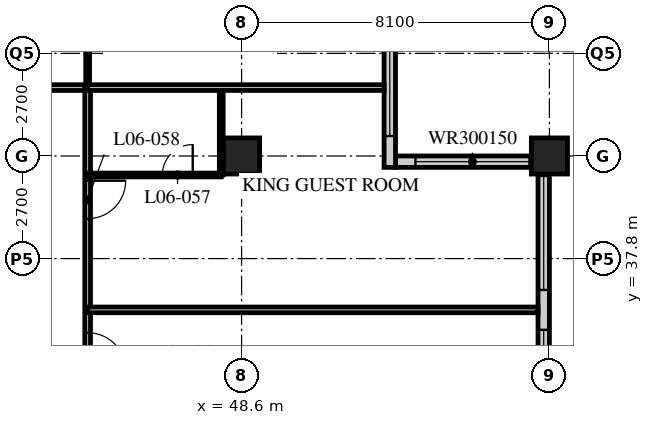
"""IFC4 building model, lengths in metres.
Left out: names, types, materials, properties, quantities, classifications, styles, units other than length and angle.
Written with IfcOpenShell. Run it as: python <this file> out.ifc"""

import sys

from ifc_helpers import new_model, si_unit, direction, frame, frame_2d, origin, origin_2d, place, context, subcontext, project, spatial, rectangle, hollow_rectangle, extrude, element, fill, save


model = new_model("IFC4")
c1 = context("Model", 3, precision=1e-05, world=origin(), true_north=direction((0.0, 1.0)))
c2 = subcontext(c1, "Body", "Model", "MODEL_VIEW")
j1 = project(units=[si_unit("LENGTHUNIT", "METRE"), si_unit("PLANEANGLEUNIT", "RADIAN")], contexts=[c1])
p1 = place(None, origin())
s1 = spatial("IfcSite", under=j1, at=p1, CompositionType="ELEMENT")
p2 = place(p1, origin())
s2 = spatial("IfcBuilding", under=s1, at=p2, CompositionType="ELEMENT")
p3 = place(p2, frame((0.0, 0.0, 33.0)))
s3 = spatial("IfcBuildingStorey", under=s2, at=p3, CompositionType="ELEMENT", Elevation=33.0)
for number, where, z_axis, x_axis in (
    (1, (48.6, 40.5, 0.0), (0.0, 0.0, 1.0), (1.0, 0.0, 0.0)),
    (2, (56.7, 40.5, 0.0), (0.0, 0.0, 1.0), (1.0, 0.0, 0.0)),
):
    element("IfcColumn", number, at=place(p3, frame(where, z_axis=z_axis, x_axis=x_axis)), inside=s3, PredefinedType="COLUMN", context=c2, shape_type="SweptSolid", body=[
        extrude(hollow_rectangle(XDim=0.95, YDim=0.95, WallThickness=0.095, at=origin_2d()), origin(), (0.0, 0.0, 1.0), 3.4),
    ])
p4 = place(p3, frame((56.55, 8.4, 0.0), z_axis=(0.0, 0.0, 1.0), x_axis=(0.0, 1.0, 0.0)))
e3 = element("IfcWall", 3, at=p4, inside=s3, PredefinedType="SOLIDWALL", context=c2, shape_type="SweptSolid", body=[
    extrude(rectangle(XDim=32.1, YDim=0.3, at=frame_2d((16.05, 0.0))), origin(), (0.0, 0.0, 1.0), 3.19),
])
p5 = place(p4, frame((0.225, 0.0, 0.9)))
e4 = element("IfcOpeningElement", 4, at=p5, cuts=e3, PredefinedType="OPENING", context=c2, shape_type="SweptSolid", body=[
    extrude(rectangle(XDim=3.0, YDim=2.0, at=frame_2d((1.5, 1.0))), frame((0.0, 0.16, 0.0), z_axis=(0.0, -1.0, 0.0), x_axis=(1.0, 0.0, 0.0)), (0.0, 0.0, 1.0), 0.32),
])
p6 = place(p4, frame((4.275, 0.0, 0.9)))
e5 = element("IfcOpeningElement", 5, at=p6, cuts=e3, PredefinedType="OPENING", context=c2, shape_type="SweptSolid", body=[
    extrude(rectangle(XDim=3.0, YDim=2.0, at=frame_2d((1.5, 1.0))), frame((0.0, 0.16, 0.0), z_axis=(0.0, -1.0, 0.0), x_axis=(1.0, 0.0, 0.0)), (0.0, 0.0, 1.0), 0.32),
])
p7 = place(p4, frame((8.325, 0.0, 0.9)))
e6 = element("IfcOpeningElement", 6, at=p7, cuts=e3, PredefinedType="OPENING", context=c2, shape_type="SweptSolid", body=[
    extrude(rectangle(XDim=3.0, YDim=2.0, at=frame_2d((1.5, 1.0))), frame((0.0, 0.16, 0.0), z_axis=(0.0, -1.0, 0.0), x_axis=(1.0, 0.0, 0.0)), (0.0, 0.0, 1.0), 0.32),
])
p8 = place(p4, frame((12.375, 0.0, 0.9)))
e7 = element("IfcOpeningElement", 7, at=p8, cuts=e3, PredefinedType="OPENING", context=c2, shape_type="SweptSolid", body=[
    extrude(rectangle(XDim=3.0, YDim=2.0, at=frame_2d((1.5, 1.0))), frame((0.0, 0.16, 0.0), z_axis=(0.0, -1.0, 0.0), x_axis=(1.0, 0.0, 0.0)), (0.0, 0.0, 1.0), 0.32),
])
p9 = place(p4, frame((16.425, 0.0, 0.9)))
e8 = element("IfcOpeningElement", 8, at=p9, cuts=e3, PredefinedType="OPENING", context=c2, shape_type="SweptSolid", body=[
    extrude(rectangle(XDim=3.0, YDim=2.0, at=frame_2d((1.5, 1.0))), frame((0.0, 0.16, 0.0), z_axis=(0.0, -1.0, 0.0), x_axis=(1.0, 0.0, 0.0)), (0.0, 0.0, 1.0), 0.32),
])
p10 = place(p4, frame((20.475, 0.0, 0.9)))
e9 = element("IfcOpeningElement", 9, at=p10, cuts=e3, PredefinedType="OPENING", context=c2, shape_type="SweptSolid", body=[
    extrude(rectangle(XDim=3.0, YDim=2.0, at=frame_2d((1.5, 1.0))), frame((0.0, 0.16, 0.0), z_axis=(0.0, -1.0, 0.0), x_axis=(1.0, 0.0, 0.0)), (0.0, 0.0, 1.0), 0.32),
])
p11 = place(p4, frame((24.525, 0.0, 0.9)))
e10 = element("IfcOpeningElement", 10, at=p11, cuts=e3, PredefinedType="OPENING", context=c2, shape_type="SweptSolid", body=[
    extrude(rectangle(XDim=3.0, YDim=2.0, at=frame_2d((1.5, 1.0))), frame((0.0, 0.16, 0.0), z_axis=(0.0, -1.0, 0.0), x_axis=(1.0, 0.0, 0.0)), (0.0, 0.0, 1.0), 0.32),
])
p12 = place(p4, frame((28.575, 0.0, 0.9)))
e11 = element("IfcOpeningElement", 11, at=p12, cuts=e3, PredefinedType="OPENING", context=c2, shape_type="SweptSolid", body=[
    extrude(rectangle(XDim=3.0, YDim=2.0, at=frame_2d((1.5, 1.0))), frame((0.0, 0.16, 0.0), z_axis=(0.0, -1.0, 0.0), x_axis=(1.0, 0.0, 0.0)), (0.0, 0.0, 1.0), 0.32),
])
p13 = place(p3, frame((56.4, 40.35, 0.0), z_axis=(0.0, 0.0, 1.0), x_axis=(-1.0, 0.0, 0.0)))
e12 = element("IfcWall", 12, at=p13, inside=s3, PredefinedType="SOLIDWALL", context=c2, shape_type="SweptSolid", body=[
    extrude(rectangle(XDim=3.75, YDim=0.3, at=frame_2d((1.875, 0.0))), origin(), (0.0, 0.0, 1.0), 3.19),
])
p14 = place(p13, frame((0.225, 0.0, 0.9)))
e13 = element("IfcOpeningElement", 13, at=p14, cuts=e12, PredefinedType="OPENING", context=c2, shape_type="SweptSolid", body=[
    extrude(rectangle(XDim=3.0, YDim=1.5, at=frame_2d((1.5, 0.75))), frame((0.0, 0.16, 0.0), z_axis=(0.0, -1.0, 0.0), x_axis=(1.0, 0.0, 0.0)), (0.0, 0.0, 1.0), 0.32),
])
p15 = place(p3, frame((52.5, 40.2, 0.0), z_axis=(0.0, 0.0, 1.0), x_axis=(0.0, 1.0, 0.0)))
e14 = element("IfcWall", 14, at=p15, inside=s3, PredefinedType="SOLIDWALL", context=c2, shape_type="SweptSolid", body=[
    extrude(rectangle(XDim=4.35, YDim=0.3, at=frame_2d((2.175, 0.0))), origin(), (0.0, 0.0, 1.0), 3.19),
])
p16 = place(p15, frame((0.825, 0.0, 0.9)))
e15 = element("IfcOpeningElement", 15, at=p16, cuts=e14, PredefinedType="OPENING", context=c2, shape_type="SweptSolid", body=[
    extrude(rectangle(XDim=3.0, YDim=1.5, at=frame_2d((1.5, 0.75))), frame((0.0, 0.16, 0.0), z_axis=(0.0, -1.0, 0.0), x_axis=(1.0, 0.0, 0.0)), (0.0, 0.0, 1.0), 0.32),
])
p17 = place(p3, frame((12.15, 42.3, 0.0), z_axis=(0.0, 0.0, 1.0), x_axis=(1.0, 0.0, 0.0)))
e16 = element("IfcWall", 16, at=p17, inside=s3, PredefinedType="PARTITIONING", context=c2, shape_type="SweptSolid", body=[
    extrude(rectangle(XDim=32.4, YDim=0.15, at=frame_2d((16.2, 0.0))), origin(), (0.0, 0.0, 1.0), 3.19),
])
p18 = place(p17, frame((6.5, 0.0, 0.0)))
e17 = element("IfcOpeningElement", 17, at=p18, cuts=e16, PredefinedType="OPENING", context=c2, shape_type="SweptSolid", body=[
    extrude(rectangle(XDim=1.0, YDim=2.1, at=frame_2d((0.5, 1.05))), frame((0.0, 0.085, 0.0), z_axis=(0.0, -1.0, 0.0), x_axis=(1.0, 0.0, 0.0)), (0.0, 0.0, 1.0), 0.17),
])
p19 = place(p17, frame((8.4, 0.0, 0.0)))
e18 = element("IfcOpeningElement", 18, at=p19, cuts=e16, PredefinedType="OPENING", context=c2, shape_type="SweptSolid", body=[
    extrude(rectangle(XDim=1.0, YDim=2.1, at=frame_2d((0.5, 1.05))), frame((0.0, 0.085, 0.0), z_axis=(0.0, -1.0, 0.0), x_axis=(1.0, 0.0, 0.0)), (0.0, 0.0, 1.0), 0.17),
])
p20 = place(p17, frame((14.6, 0.0, 0.0)))
e19 = element("IfcOpeningElement", 19, at=p20, cuts=e16, PredefinedType="OPENING", context=c2, shape_type="SweptSolid", body=[
    extrude(rectangle(XDim=1.0, YDim=2.1, at=frame_2d((0.5, 1.05))), frame((0.0, 0.085, 0.0), z_axis=(0.0, -1.0, 0.0), x_axis=(1.0, 0.0, 0.0)), (0.0, 0.0, 1.0), 0.17),
])
p21 = place(p17, frame((18.65, 0.0, 0.0)))
e20 = element("IfcOpeningElement", 20, at=p21, cuts=e16, PredefinedType="OPENING", context=c2, shape_type="SweptSolid", body=[
    extrude(rectangle(XDim=1.0, YDim=2.1, at=frame_2d((0.5, 1.05))), frame((0.0, 0.085, 0.0), z_axis=(0.0, -1.0, 0.0), x_axis=(1.0, 0.0, 0.0)), (0.0, 0.0, 1.0), 0.17),
])
p22 = place(p17, frame((23.0, 0.0, 0.0)))
e21 = element("IfcOpeningElement", 21, at=p22, cuts=e16, PredefinedType="OPENING", context=c2, shape_type="SweptSolid", body=[
    extrude(rectangle(XDim=1.0, YDim=2.1, at=frame_2d((0.5, 1.05))), frame((0.0, 0.085, 0.0), z_axis=(0.0, -1.0, 0.0), x_axis=(1.0, 0.0, 0.0)), (0.0, 0.0, 1.0), 0.17),
])
p23 = place(p17, frame((26.75, 0.0, 0.0)))
e22 = element("IfcOpeningElement", 22, at=p23, cuts=e16, PredefinedType="OPENING", context=c2, shape_type="SweptSolid", body=[
    extrude(rectangle(XDim=1.0, YDim=2.1, at=frame_2d((0.5, 1.05))), frame((0.0, 0.085, 0.0), z_axis=(0.0, -1.0, 0.0), x_axis=(1.0, 0.0, 0.0)), (0.0, 0.0, 1.0), 0.17),
])
p24 = place(p17, frame((28.775, 0.0, 0.0)))
e23 = element("IfcOpeningElement", 23, at=p24, cuts=e16, PredefinedType="OPENING", context=c2, shape_type="SweptSolid", body=[
    extrude(rectangle(XDim=1.0, YDim=2.1, at=frame_2d((0.5, 1.05))), frame((0.0, 0.085, 0.0), z_axis=(0.0, -1.0, 0.0), x_axis=(1.0, 0.0, 0.0)), (0.0, 0.0, 1.0), 0.17),
])
p25 = place(p17, frame((2.625, 0.0, 0.0)))
e24 = element("IfcOpeningElement", 24, at=p25, cuts=e16, PredefinedType="OPENING", context=c2, shape_type="SweptSolid", body=[
    extrude(rectangle(XDim=1.0, YDim=2.1, at=frame_2d((0.5, 1.05))), frame((0.0, 0.085, 0.0), z_axis=(0.0, -1.0, 0.0), x_axis=(1.0, 0.0, 0.0)), (0.0, 0.0, 1.0), 0.17),
])
p26 = place(p3, frame((44.55, 16.2, 0.0), z_axis=(0.0, 0.0, 1.0), x_axis=(0.0, 1.0, 0.0)))
e25 = element("IfcWall", 25, at=p26, inside=s3, PredefinedType="PARTITIONING", context=c2, shape_type="SweptSolid", body=[
    extrude(rectangle(XDim=26.1, YDim=0.15, at=frame_2d((13.05, 0.0))), origin(), (0.0, 0.0, 1.0), 3.19),
])
p27 = place(p26, frame((2.75, 0.0, 0.0)))
e26 = element("IfcOpeningElement", 26, at=p27, cuts=e25, PredefinedType="OPENING", context=c2, shape_type="SweptSolid", body=[
    extrude(rectangle(XDim=1.0, YDim=2.1, at=frame_2d((0.5, 1.05))), frame((0.0, 0.085, 0.0), z_axis=(0.0, -1.0, 0.0), x_axis=(1.0, 0.0, 0.0)), (0.0, 0.0, 1.0), 0.17),
])
p28 = place(p26, frame((4.35, 0.0, 0.0)))
e27 = element("IfcOpeningElement", 27, at=p28, cuts=e25, PredefinedType="OPENING", context=c2, shape_type="SweptSolid", body=[
    extrude(rectangle(XDim=1.0, YDim=2.1, at=frame_2d((0.5, 1.05))), frame((0.0, 0.085, 0.0), z_axis=(0.0, -1.0, 0.0), x_axis=(1.0, 0.0, 0.0)), (0.0, 0.0, 1.0), 0.17),
])
p29 = place(p26, frame((8.4, 0.0, 0.0)))
e28 = element("IfcOpeningElement", 28, at=p29, cuts=e25, PredefinedType="OPENING", context=c2, shape_type="SweptSolid", body=[
    extrude(rectangle(XDim=1.0, YDim=2.1, at=frame_2d((0.5, 1.05))), frame((0.0, 0.085, 0.0), z_axis=(0.0, -1.0, 0.0), x_axis=(1.0, 0.0, 0.0)), (0.0, 0.0, 1.0), 0.17),
])
p30 = place(p26, frame((14.6, 0.0, 0.0)))
e29 = element("IfcOpeningElement", 29, at=p30, cuts=e25, PredefinedType="OPENING", context=c2, shape_type="SweptSolid", body=[
    extrude(rectangle(XDim=1.0, YDim=2.1, at=frame_2d((0.5, 1.05))), frame((0.0, 0.085, 0.0), z_axis=(0.0, -1.0, 0.0), x_axis=(1.0, 0.0, 0.0)), (0.0, 0.0, 1.0), 0.17),
])
p31 = place(p26, frame((18.65, 0.0, 0.0)))
e30 = element("IfcOpeningElement", 30, at=p31, cuts=e25, PredefinedType="OPENING", context=c2, shape_type="SweptSolid", body=[
    extrude(rectangle(XDim=1.0, YDim=2.1, at=frame_2d((0.5, 1.05))), frame((0.0, 0.085, 0.0), z_axis=(0.0, -1.0, 0.0), x_axis=(1.0, 0.0, 0.0)), (0.0, 0.0, 1.0), 0.17),
])
p32 = place(p26, frame((22.65, 0.0, 0.0)))
e31 = element("IfcOpeningElement", 31, at=p32, cuts=e25, PredefinedType="OPENING", context=c2, shape_type="SweptSolid", body=[
    extrude(rectangle(XDim=1.0, YDim=2.1, at=frame_2d((0.5, 1.05))), frame((0.0, 0.085, 0.0), z_axis=(0.0, -1.0, 0.0), x_axis=(1.0, 0.0, 0.0)), (0.0, 0.0, 1.0), 0.17),
])
p33 = place(p3, frame((44.55, 36.45, 0.0), z_axis=(0.0, 0.0, 1.0), x_axis=(1.0, 0.0, 0.0)))
e32 = element("IfcWall", 32, at=p33, inside=s3, PredefinedType="PARTITIONING", context=c2, shape_type="SweptSolid", body=[
    extrude(rectangle(XDim=11.85, YDim=0.15, at=frame_2d((5.925, 0.0))), origin(), (0.0, 0.0, 1.0), 3.19),
])
p34 = place(p3, frame((48.065, 40.0, 0.0), z_axis=(0.0, 0.0, 1.0), x_axis=(0.0, 1.0, 0.0)))
e33 = element("IfcWall", 33, at=p34, inside=s3, PredefinedType="PARTITIONING", context=c2, shape_type="SweptSolid", body=[
    extrude(rectangle(XDim=2.3, YDim=0.1, at=frame_2d((1.15, 0.0))), origin(), (0.0, 0.0, 1.0), 3.19),
])
p35 = place(p3, frame((44.55, 40.0, 0.0), z_axis=(0.0, 0.0, 1.0), x_axis=(1.0, 0.0, 0.0)))
e34 = element("IfcWall", 34, at=p35, inside=s3, PredefinedType="PARTITIONING", context=c2, shape_type="SweptSolid", body=[
    extrude(rectangle(XDim=3.515, YDim=0.1, at=frame_2d((1.757, 0.0))), origin(), (0.0, 0.0, 1.0), 3.19),
])
p36 = place(p35, frame((1.965, 0.0, 0.0)))
e35 = element("IfcOpeningElement", 35, at=p36, cuts=e34, PredefinedType="OPENING", context=c2, shape_type="SweptSolid", body=[
    extrude(rectangle(XDim=0.8, YDim=2.1, at=frame_2d((0.4, 1.05))), frame((0.0, 0.06, 0.0), z_axis=(0.0, -1.0, 0.0), x_axis=(1.0, 0.0, 0.0)), (0.0, 0.0, 1.0), 0.12),
])
p37 = place(p3, frame((44.55, 42.3, 0.0), z_axis=(0.0, 0.0, 1.0), x_axis=(0.0, 1.0, 0.0)))
e36 = element("IfcWall", 36, at=p37, inside=s3, PredefinedType="PARTITIONING", context=c2, shape_type="SweptSolid", body=[
    extrude(rectangle(XDim=2.4, YDim=0.1, at=frame_2d((1.2, 0.0))), origin(), (0.0, 0.0, 1.0), 3.19),
])
p38 = place(p3, frame((44.55, 42.3, 0.0), z_axis=(0.0, 0.0, 1.0), x_axis=(1.0, 0.0, 0.0)))
e37 = element("IfcWall", 37, at=p38, inside=s3, PredefinedType="PARTITIONING", context=c2, shape_type="SweptSolid", body=[
    extrude(rectangle(XDim=7.8, YDim=0.15, at=frame_2d((3.9, 0.0))), origin(), (0.0, 0.0, 1.0), 3.19),
])
p39 = place(p11, origin())
e38 = element("IfcWindow", 38, at=p39, inside=s3, PartitioningType="SINGLE_PANEL", PredefinedType="WINDOW", context=c2, shape_type="SweptSolid", body=[
    extrude(rectangle(XDim=3.0, YDim=2.0, at=frame_2d((1.5, 1.0))), frame((0.0, 0.03, 0.0), z_axis=(0.0, -1.0, 0.0), x_axis=(1.0, 0.0, 0.0)), (0.0, 0.0, 1.0), 0.06),
])
fill(e10, e38)
p40 = place(p12, origin())
e39 = element("IfcWindow", 39, at=p40, inside=s3, PartitioningType="SINGLE_PANEL", PredefinedType="WINDOW", context=c2, shape_type="SweptSolid", body=[
    extrude(rectangle(XDim=3.0, YDim=2.0, at=frame_2d((1.5, 1.0))), frame((0.0, 0.03, 0.0), z_axis=(0.0, -1.0, 0.0), x_axis=(1.0, 0.0, 0.0)), (0.0, 0.0, 1.0), 0.06),
])
fill(e11, e39)
p41 = place(p14, origin())
e40 = element("IfcWindow", 40, at=p41, inside=s3, PartitioningType="SINGLE_PANEL", PredefinedType="WINDOW", context=c2, shape_type="SweptSolid", body=[
    extrude(rectangle(XDim=3.0, YDim=1.5, at=frame_2d((1.5, 0.75))), frame((0.0, 0.03, 0.0), z_axis=(0.0, -1.0, 0.0), x_axis=(1.0, 0.0, 0.0)), (0.0, 0.0, 1.0), 0.06),
])
fill(e13, e40)
p42 = place(p16, origin())
e41 = element("IfcWindow", 41, at=p42, inside=s3, PartitioningType="SINGLE_PANEL", PredefinedType="WINDOW", context=c2, shape_type="SweptSolid", body=[
    extrude(rectangle(XDim=3.0, YDim=1.5, at=frame_2d((1.5, 0.75))), frame((0.0, 0.03, 0.0), z_axis=(0.0, -1.0, 0.0), x_axis=(1.0, 0.0, 0.0)), (0.0, 0.0, 1.0), 0.06),
])
fill(e15, e41)
p43 = place(p31, origin())
e42 = element("IfcDoor", 42, at=p43, inside=s3, OperationType="SINGLE_SWING_RIGHT", PredefinedType="DOOR", context=c2, shape_type="SweptSolid", body=[
    extrude(rectangle(XDim=1.0, YDim=2.1, at=frame_2d((0.5, 1.05))), frame((0.0, 0.025, 0.0), z_axis=(0.0, -1.0, 0.0), x_axis=(1.0, 0.0, 0.0)), (0.0, 0.0, 1.0), 0.05),
])
fill(e30, e42)
p44 = place(p36, origin())
e43 = element("IfcDoor", 43, at=p44, inside=s3, OperationType="SINGLE_SWING_RIGHT", PredefinedType="DOOR", context=c2, shape_type="SweptSolid", body=[
    extrude(rectangle(XDim=0.8, YDim=2.1, at=frame_2d((0.4, 1.05))), frame((0.0, 0.025, 0.0), z_axis=(0.0, -1.0, 0.0), x_axis=(1.0, 0.0, 0.0)), (0.0, 0.0, 1.0), 0.05),
])
fill(e35, e43)
p45 = place(p32, origin())
e44 = element("IfcDoor", 44, at=p45, inside=s3, OperationType="SINGLE_SWING_LEFT", PredefinedType="DOOR", context=c2, shape_type="SweptSolid", body=[
    extrude(rectangle(XDim=1.0, YDim=2.1, at=frame_2d((0.5, 1.05))), frame((0.0, 0.025, 0.0), z_axis=(0.0, -1.0, 0.0), x_axis=(1.0, 0.0, 0.0)), (0.0, 0.0, 1.0), 0.05),
])
fill(e31, e44)
save(model, sys.argv[1])
